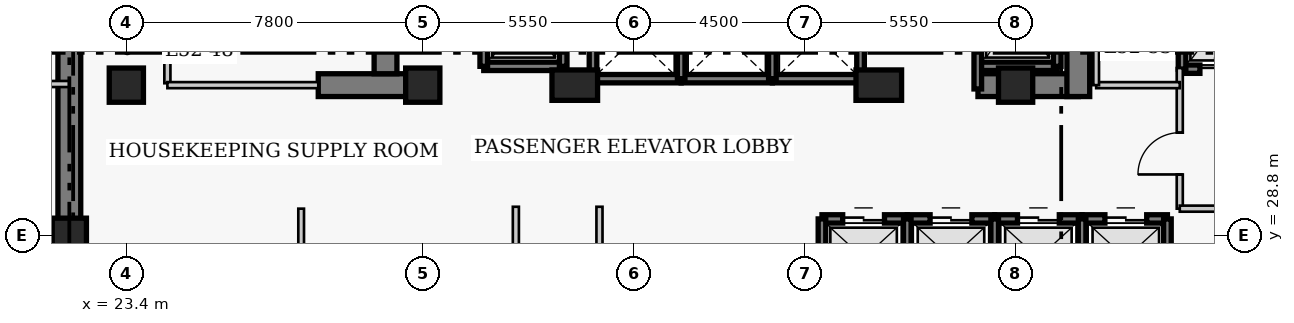
"""IFC4 building model, lengths in metres.
Left out: names, types, materials, properties, quantities, classifications, styles, units other than length and angle.
Written with IfcOpenShell. Run it as: python <this file> out.ifc"""

import sys

from ifc_helpers import new_model, si_unit, direction, frame, frame_2d, origin, origin_2d, place, context, subcontext, project, spatial, rectangle, extrude, element, fill, save


model = new_model("IFC4")
c1 = context("Model", 3, precision=1e-05, world=origin(), true_north=direction((0.0, 1.0)))
c2 = subcontext(c1, "Body", "Model", "MODEL_VIEW")
j1 = project(units=[si_unit("LENGTHUNIT", "METRE"), si_unit("PLANEANGLEUNIT", "RADIAN")], contexts=[c1])
p1 = place(None, origin())
s1 = spatial("IfcSite", under=j1, at=p1, CompositionType="ELEMENT")
p2 = place(p1, origin())
s2 = spatial("IfcBuilding", under=s1, at=p2, CompositionType="ELEMENT")
p3 = place(p2, frame((0.0, 0.0, 208.5)))
s3 = spatial("IfcBuildingStorey", under=s2, at=p3, CompositionType="ELEMENT", Elevation=208.5)
p4 = place(p3, frame((21.9, 27.05, 0.0), z_axis=(0.0, 0.0, 1.0), x_axis=(0.0, 1.0, 0.0)))
e1 = element("IfcWall", 1, at=p4, inside=s3, PredefinedType="SHEAR", context=c2, shape_type="SweptSolid", body=[
    extrude(rectangle(XDim=13.57, YDim=0.6, at=frame_2d((6.785, 0.0))), origin(), (0.0, 0.0, 1.0), 3.9),
])
p5 = place(p3, frame((28.45, 32.75, 0.0), z_axis=(0.0, 0.0, 1.0), x_axis=(1.0, 0.0, 0.0)))
e2 = element("IfcWall", 2, at=p5, inside=s3, PredefinedType="SHEAR", context=c2, shape_type="SweptSolid", body=[
    extrude(rectangle(XDim=2.4, YDim=0.6, at=frame_2d((1.2, 0.0))), origin(), (0.0, 0.0, 1.0), 3.9),
])
p6 = place(p3, frame((45.81, 32.75, 0.0), z_axis=(0.0, 0.0, 1.0), x_axis=(1.0, 0.0, 0.0)))
e3 = element("IfcWall", 3, at=p6, inside=s3, PredefinedType="SHEAR", context=c2, shape_type="SweptSolid", body=[
    extrude(rectangle(XDim=2.64, YDim=0.6, at=frame_2d((1.32, 0.0))), origin(), (0.0, 0.0, 1.0), 3.9),
])
p7 = place(p3, frame((30.22, 33.05, 0.0), z_axis=(0.0, 0.0, 1.0), x_axis=(0.0, 1.0, 0.0)))
e4 = element("IfcWall", 4, at=p7, inside=s3, PredefinedType="SHEAR", context=c2, shape_type="SweptSolid", body=[
    extrude(rectangle(XDim=7.27, YDim=0.6, at=frame_2d((3.635, 0.0))), origin(), (0.0, 0.0, 1.0), 3.9),
])
p8 = place(p3, frame((48.45, 32.45, 0.0), z_axis=(0.0, 0.0, 1.0), x_axis=(0.0, 1.0, 0.0)))
e5 = element("IfcWall", 5, at=p8, inside=s3, PredefinedType="SHEAR", context=c2, shape_type="SweptSolid", body=[
    extrude(rectangle(XDim=7.87, YDim=0.6, at=frame_2d((3.935, 0.0))), origin(), (0.0, 0.0, 1.0), 3.9),
])
p9 = place(p8, frame((5.75, 0.0, 0.0)))
e6 = element("IfcOpeningElement", 6, at=p9, cuts=e5, PredefinedType="OPENING", context=c2, shape_type="SweptSolid", body=[
    extrude(rectangle(XDim=1.1, YDim=2.15, at=frame_2d((0.55, 1.075))), frame((0.0, 0.31, 0.0), z_axis=(0.0, -1.0, 0.0), x_axis=(1.0, 0.0, 0.0)), (0.0, 0.0, 1.0), 0.62),
])
for number, where, z_axis, x_axis in (
    (7, (21.9, 28.8, 0.0), (0.0, 0.0, 1.0), (1.0, 0.0, 0.0)),
    (8, (23.4, 32.75, 0.0), (0.0, 0.0, 1.0), (1.0, 0.0, 0.0)),
    (9, (31.2, 32.75, 0.0), (0.0, 0.0, 1.0), (1.0, 0.0, 0.0)),
):
    element("IfcColumn", number, at=place(p3, frame(where, z_axis=z_axis, x_axis=x_axis)), inside=s3, PredefinedType="COLUMN", context=c2, shape_type="SweptSolid", body=[
        extrude(rectangle(XDim=0.9, YDim=0.9, at=origin_2d()), origin(), (0.0, 0.0, 1.0), 3.9),
    ])
for number, where, z_axis, x_axis in (
    (10, (35.2, 32.75, 0.0), (0.0, 0.0, 1.0), (1.0, 0.0, 0.0)),
    (11, (43.2, 32.75, 0.0), (0.0, 0.0, 1.0), (1.0, 0.0, 0.0)),
):
    element("IfcColumn", number, at=place(p3, frame(where, z_axis=z_axis, x_axis=x_axis)), inside=s3, PredefinedType="COLUMN", context=c2, shape_type="SweptSolid", body=[
        extrude(rectangle(XDim=1.2, YDim=0.8, at=origin_2d()), origin(), (0.0, 0.0, 1.0), 3.9),
    ])
p10 = place(p3, frame((46.8, 32.75, 0.0), z_axis=(0.0, 0.0, 1.0), x_axis=(1.0, 0.0, 0.0)))
e12 = element("IfcColumn", 12, at=p10, inside=s3, PredefinedType="COLUMN", context=c2, shape_type="SweptSolid", body=[
    extrude(rectangle(XDim=0.9, YDim=0.9, at=origin_2d()), origin(), (0.0, 0.0, 1.0), 3.9),
])
p11 = place(p3, frame((41.705, 29.23, 0.0), z_axis=(0.0, 0.0, 1.0), x_axis=(1.0, 0.0, 0.0)))
e13 = element("IfcWall", 13, at=p11, inside=s3, PredefinedType="SHEAR", context=c2, shape_type="SweptSolid", body=[
    extrude(rectangle(XDim=2.245, YDim=0.22, at=frame_2d((1.123, 0.0))), origin(), (0.0, 0.0, 1.0), 3.9),
])
p12 = place(p11, frame((0.545, 0.0, 0.0)))
e14 = element("IfcOpeningElement", 14, at=p12, cuts=e13, PredefinedType="OPENING", context=c2, shape_type="SweptSolid", body=[
    extrude(rectangle(XDim=1.1, YDim=2.15, at=frame_2d((0.55, 1.075))), frame((0.0, 0.12, 0.0), z_axis=(0.0, -1.0, 0.0), x_axis=(1.0, 0.0, 0.0)), (0.0, 0.0, 1.0), 0.24),
])
p13 = place(p3, frame((41.705, 27.17, 0.0), z_axis=(0.0, 0.0, 1.0), x_axis=(0.0, 1.0, 0.0)))
e15 = element("IfcWall", 15, at=p13, inside=s3, PredefinedType="SHEAR", context=c2, shape_type="SweptSolid", body=[
    extrude(rectangle(XDim=2.06, YDim=0.2, at=frame_2d((1.03, 0.0))), origin(), (0.0, 0.0, 1.0), 3.9),
])
p14 = place(p3, frame((43.95, 29.23, 0.0), z_axis=(0.0, 0.0, 1.0), x_axis=(1.0, 0.0, 0.0)))
e16 = element("IfcWall", 16, at=p14, inside=s3, PredefinedType="SHEAR", context=c2, shape_type="SweptSolid", body=[
    extrude(rectangle(XDim=2.3, YDim=0.22, at=frame_2d((1.15, 0.0))), origin(), (0.0, 0.0, 1.0), 3.9),
])
p15 = place(p14, frame((0.6, 0.0, 0.0)))
e17 = element("IfcOpeningElement", 17, at=p15, cuts=e16, PredefinedType="OPENING", context=c2, shape_type="SweptSolid", body=[
    extrude(rectangle(XDim=1.1, YDim=2.15, at=frame_2d((0.55, 1.075))), frame((0.0, 0.12, 0.0), z_axis=(0.0, -1.0, 0.0), x_axis=(1.0, 0.0, 0.0)), (0.0, 0.0, 1.0), 0.24),
])
p16 = place(p3, frame((43.95, 27.17, 0.0), z_axis=(0.0, 0.0, 1.0), x_axis=(0.0, 1.0, 0.0)))
e18 = element("IfcWall", 18, at=p16, inside=s3, PredefinedType="SHEAR", context=c2, shape_type="SweptSolid", body=[
    extrude(rectangle(XDim=2.06, YDim=0.2, at=frame_2d((1.03, 0.0))), origin(), (0.0, 0.0, 1.0), 3.9),
])
p17 = place(p3, frame((46.25, 29.23, 0.0), z_axis=(0.0, 0.0, 1.0), x_axis=(1.0, 0.0, 0.0)))
e19 = element("IfcWall", 19, at=p17, inside=s3, PredefinedType="SHEAR", context=c2, shape_type="SweptSolid", body=[
    extrude(rectangle(XDim=2.3, YDim=0.22, at=frame_2d((1.15, 0.0))), origin(), (0.0, 0.0, 1.0), 3.9),
])
p18 = place(p17, frame((0.6, 0.0, 0.0)))
e20 = element("IfcOpeningElement", 20, at=p18, cuts=e19, PredefinedType="OPENING", context=c2, shape_type="SweptSolid", body=[
    extrude(rectangle(XDim=1.1, YDim=2.15, at=frame_2d((0.55, 1.075))), frame((0.0, 0.12, 0.0), z_axis=(0.0, -1.0, 0.0), x_axis=(1.0, 0.0, 0.0)), (0.0, 0.0, 1.0), 0.24),
])
p19 = place(p3, frame((46.25, 27.17, 0.0), z_axis=(0.0, 0.0, 1.0), x_axis=(0.0, 1.0, 0.0)))
e21 = element("IfcWall", 21, at=p19, inside=s3, PredefinedType="SHEAR", context=c2, shape_type="SweptSolid", body=[
    extrude(rectangle(XDim=2.06, YDim=0.2, at=frame_2d((1.03, 0.0))), origin(), (0.0, 0.0, 1.0), 3.9),
])
p20 = place(p3, frame((48.55, 29.23, 0.0), z_axis=(0.0, 0.0, 1.0), x_axis=(1.0, 0.0, 0.0)))
e22 = element("IfcWall", 22, at=p20, inside=s3, PredefinedType="SHEAR", context=c2, shape_type="SweptSolid", body=[
    extrude(rectangle(XDim=2.245, YDim=0.22, at=frame_2d((1.123, 0.0))), origin(), (0.0, 0.0, 1.0), 3.9),
])
p21 = place(p20, frame((0.6, 0.0, 0.0)))
e23 = element("IfcOpeningElement", 23, at=p21, cuts=e22, PredefinedType="OPENING", context=c2, shape_type="SweptSolid", body=[
    extrude(rectangle(XDim=1.1, YDim=2.15, at=frame_2d((0.55, 1.075))), frame((0.0, 0.12, 0.0), z_axis=(0.0, -1.0, 0.0), x_axis=(1.0, 0.0, 0.0)), (0.0, 0.0, 1.0), 0.24),
])
for number, where, z_axis, x_axis in (
    (24, (48.55, 27.17, 0.0), (0.0, 0.0, 1.0), (0.0, 1.0, 0.0)),
    (25, (50.795, 27.17, 0.0), (0.0, 0.0, 1.0), (0.0, 1.0, 0.0)),
):
    element("IfcWall", number, at=place(p3, frame(where, z_axis=z_axis, x_axis=x_axis)), inside=s3, PredefinedType="SHEAR", context=c2, shape_type="SweptSolid", body=[
        extrude(rectangle(XDim=2.06, YDim=0.2, at=frame_2d((1.03, 0.0))), origin(), (0.0, 0.0, 1.0), 3.9),
    ])
p22 = place(p3, frame((35.68, 32.92, 0.0), z_axis=(0.0, 0.0, 1.0), x_axis=(1.0, 0.0, 0.0)))
e26 = element("IfcWall", 26, at=p22, inside=s3, PredefinedType="SHEAR", context=c2, shape_type="SweptSolid", body=[
    extrude(rectangle(XDim=2.32, YDim=0.22, at=frame_2d((1.16, 0.0))), origin(), (0.0, 0.0, 1.0), 3.9),
])
p23 = place(p3, frame((35.68, 32.92, 0.0), z_axis=(0.0, 0.0, 1.0), x_axis=(0.0, 1.0, 0.0)))
e27 = element("IfcWall", 27, at=p23, inside=s3, PredefinedType="SHEAR", context=c2, shape_type="SweptSolid", body=[
    extrude(rectangle(XDim=2.16, YDim=0.2, at=frame_2d((1.08, 0.0))), origin(), (0.0, 0.0, 1.0), 3.9),
])
p24 = place(p3, frame((38.0, 32.92, 0.0), z_axis=(0.0, 0.0, 1.0), x_axis=(1.0, 0.0, 0.0)))
e28 = element("IfcWall", 28, at=p24, inside=s3, PredefinedType="SHEAR", context=c2, shape_type="SweptSolid", body=[
    extrude(rectangle(XDim=2.4, YDim=0.22, at=frame_2d((1.2, 0.0))), origin(), (0.0, 0.0, 1.0), 3.9),
])
p25 = place(p3, frame((38.0, 32.92, 0.0), z_axis=(0.0, 0.0, 1.0), x_axis=(0.0, 1.0, 0.0)))
e29 = element("IfcWall", 29, at=p25, inside=s3, PredefinedType="SHEAR", context=c2, shape_type="SweptSolid", body=[
    extrude(rectangle(XDim=2.16, YDim=0.2, at=frame_2d((1.08, 0.0))), origin(), (0.0, 0.0, 1.0), 3.9),
])
p26 = place(p3, frame((40.4, 32.92, 0.0), z_axis=(0.0, 0.0, 1.0), x_axis=(1.0, 0.0, 0.0)))
e30 = element("IfcWall", 30, at=p26, inside=s3, PredefinedType="SHEAR", context=c2, shape_type="SweptSolid", body=[
    extrude(rectangle(XDim=2.32, YDim=0.22, at=frame_2d((1.16, 0.0))), origin(), (0.0, 0.0, 1.0), 3.9),
])
for number, where, z_axis, x_axis in (
    (31, (40.4, 32.92, 0.0), (0.0, 0.0, 1.0), (0.0, 1.0, 0.0)),
    (32, (42.72, 32.92, 0.0), (0.0, 0.0, 1.0), (0.0, 1.0, 0.0)),
):
    element("IfcWall", number, at=place(p3, frame(where, z_axis=z_axis, x_axis=x_axis)), inside=s3, PredefinedType="SHEAR", context=c2, shape_type="SweptSolid", body=[
        extrude(rectangle(XDim=2.16, YDim=0.2, at=frame_2d((1.08, 0.0))), origin(), (0.0, 0.0, 1.0), 3.9),
    ])
p27 = place(p3, frame((51.18, 33.17, 0.0), z_axis=(0.0, 0.0, 1.0), x_axis=(1.0, 0.0, 0.0)))
e33 = element("IfcWall", 33, at=p27, inside=s3, PredefinedType="SHEAR", context=c2, shape_type="SweptSolid", body=[
    extrude(rectangle(XDim=2.42, YDim=0.22, at=frame_2d((1.21, 0.0))), origin(), (0.0, 0.0, 1.0), 3.9),
])
p28 = place(p27, frame((0.47, 0.0, 0.0)))
e34 = element("IfcOpeningElement", 34, at=p28, cuts=e33, PredefinedType="OPENING", context=c2, shape_type="SweptSolid", body=[
    extrude(rectangle(XDim=1.3, YDim=2.15, at=frame_2d((0.65, 1.075))), frame((0.0, 0.12, 0.0), z_axis=(0.0, -1.0, 0.0), x_axis=(1.0, 0.0, 0.0)), (0.0, 0.0, 1.0), 0.24),
])
p29 = place(p3, frame((51.18, 33.17, 0.0), z_axis=(0.0, 0.0, 1.0), x_axis=(0.0, 1.0, 0.0)))
e35 = element("IfcWall", 35, at=p29, inside=s3, PredefinedType="SHEAR", context=c2, shape_type="SweptSolid", body=[
    extrude(rectangle(XDim=2.86, YDim=0.2, at=frame_2d((1.43, 0.0))), origin(), (0.0, 0.0, 1.0), 3.9),
])
p30 = place(p3, frame((32.805, 33.245, 0.0), z_axis=(0.0, 0.0, 1.0), x_axis=(1.0, 0.0, 0.0)))
e36 = element("IfcWall", 36, at=p30, inside=s3, PredefinedType="SHEAR", context=c2, shape_type="SweptSolid", body=[
    extrude(rectangle(XDim=2.09, YDim=0.22, at=frame_2d((1.045, 0.0))), origin(), (0.0, 0.0, 1.0), 3.9),
])
for number, where, z_axis, x_axis in (
    (37, (32.805, 33.245, 0.0), (0.0, 0.0, 1.0), (0.0, 1.0, 0.0)),
    (38, (34.895, 33.245, 0.0), (0.0, 0.0, 1.0), (0.0, 1.0, 0.0)),
):
    element("IfcWall", number, at=place(p3, frame(where, z_axis=z_axis, x_axis=x_axis)), inside=s3, PredefinedType="SHEAR", context=c2, shape_type="SweptSolid", body=[
        extrude(rectangle(XDim=2.91, YDim=0.2, at=frame_2d((1.455, 0.0))), origin(), (0.0, 0.0, 1.0), 3.9),
    ])
p31 = place(p3, frame((45.805, 33.245, 0.0), z_axis=(0.0, 0.0, 1.0), x_axis=(1.0, 0.0, 0.0)))
e39 = element("IfcWall", 39, at=p31, inside=s3, PredefinedType="SHEAR", context=c2, shape_type="SweptSolid", body=[
    extrude(rectangle(XDim=2.09, YDim=0.22, at=frame_2d((1.045, 0.0))), origin(), (0.0, 0.0, 1.0), 3.9),
])
p32 = place(p3, frame((45.805, 32.65, 0.0), z_axis=(0.0, 0.0, 1.0), x_axis=(0.0, 1.0, 0.0)))
e40 = element("IfcWall", 40, at=p32, inside=s3, PredefinedType="SHEAR", context=c2, shape_type="SweptSolid", body=[
    extrude(rectangle(XDim=3.505, YDim=0.2, at=frame_2d((1.752, 0.0))), origin(), (0.0, 0.0, 1.0), 3.9),
])
p33 = place(p3, frame((47.895, 33.245, 0.0), z_axis=(0.0, 0.0, 1.0), x_axis=(0.0, 1.0, 0.0)))
e41 = element("IfcWall", 41, at=p33, inside=s3, PredefinedType="SHEAR", context=c2, shape_type="SweptSolid", body=[
    extrude(rectangle(XDim=2.91, YDim=0.2, at=frame_2d((1.455, 0.0))), origin(), (0.0, 0.0, 1.0), 3.9),
])
p34 = place(p3, frame((24.48, 32.8, 0.0), z_axis=(0.0, 0.0, 1.0), x_axis=(0.0, 1.0, 0.0)))
e42 = element("IfcWall", 42, at=p34, inside=s3, PredefinedType="PARTITIONING", context=c2, shape_type="SweptSolid", body=[
    extrude(rectangle(XDim=3.57, YDim=0.16, at=frame_2d((1.785, 0.0))), origin(), (0.0, 0.0, 1.0), 3.65),
])
p35 = place(p34, frame((1.604, 0.0, 0.0)))
e43 = element("IfcOpeningElement", 43, at=p35, cuts=e42, PredefinedType="OPENING", context=c2, shape_type="SweptSolid", body=[
    extrude(rectangle(XDim=0.9, YDim=2.1, at=frame_2d((0.45, 1.05))), frame((0.0, 0.09, 0.0), z_axis=(0.0, -1.0, 0.0), x_axis=(1.0, 0.0, 0.0)), (0.0, 0.0, 1.0), 0.18),
])
p36 = place(p3, frame((51.12, 29.5, 0.0), z_axis=(0.0, 0.0, 1.0), x_axis=(0.0, 1.0, 0.0)))
e44 = element("IfcWall", 44, at=p36, inside=s3, PredefinedType="PARTITIONING", context=c2, shape_type="SweptSolid", body=[
    extrude(rectangle(XDim=3.7, YDim=0.16, at=frame_2d((1.85, 0.0))), origin(), (0.0, 0.0, 1.0), 3.65),
])
p37 = place(p36, frame((0.9, 0.0, 0.0)))
e45 = element("IfcOpeningElement", 45, at=p37, cuts=e44, PredefinedType="OPENING", context=c2, shape_type="SweptSolid", body=[
    extrude(rectangle(XDim=1.1, YDim=2.15, at=frame_2d((0.55, 1.075))), frame((0.0, 0.09, 0.0), z_axis=(0.0, -1.0, 0.0), x_axis=(1.0, 0.0, 0.0)), (0.0, 0.0, 1.0), 0.18),
])
p38 = place(p3, frame((51.12, 29.5, 0.0), z_axis=(0.0, 0.0, 1.0), x_axis=(1.0, 0.0, 0.0)))
e46 = element("IfcWall", 46, at=p38, inside=s3, PredefinedType="PARTITIONING", context=c2, shape_type="SweptSolid", body=[
    extrude(rectangle(XDim=5.63, YDim=0.16, at=frame_2d((2.815, 0.0))), origin(), (0.0, 0.0, 1.0), 3.65),
])
p39 = place(p3, frame((24.48, 32.75, 0.0), z_axis=(0.0, 0.0, 1.0), x_axis=(1.0, 0.0, 0.0)))
e47 = element("IfcWall", 47, at=p39, inside=s3, PredefinedType="PARTITIONING", context=c2, shape_type="SweptSolid", body=[
    extrude(rectangle(XDim=3.97, YDim=0.16, at=frame_2d((1.985, 0.0))), origin(), (0.0, 0.0, 1.0), 3.65),
])
p40 = place(p3, frame((48.92, 32.75, 0.0), z_axis=(0.0, 0.0, 1.0), x_axis=(1.0, 0.0, 0.0)))
e48 = element("IfcWall", 48, at=p40, inside=s3, PredefinedType="PARTITIONING", context=c2, shape_type="SweptSolid", body=[
    extrude(rectangle(XDim=2.2, YDim=0.16, at=frame_2d((1.1, 0.0))), origin(), (0.0, 0.0, 1.0), 3.65),
])
p41 = place(p3, frame((48.92, 32.75, 0.0), z_axis=(0.0, 0.0, 1.0), x_axis=(0.0, 1.0, 0.0)))
e49 = element("IfcWall", 49, at=p41, inside=s3, PredefinedType="PARTITIONING", context=c2, shape_type="SweptSolid", body=[
    extrude(rectangle(XDim=3.62, YDim=0.15, at=frame_2d((1.81, 0.0))), origin(), (0.0, 0.0, 1.0), 3.65),
])
for number, where, z_axis, x_axis in (
    (50, (33.65, 18.51, 0.0), (0.0, 0.0, 1.0), (0.0, 1.0, 0.0)),
    (51, (35.85, 18.51, 0.0), (0.0, 0.0, 1.0), (0.0, 1.0, 0.0)),
):
    element("IfcWall", number, at=place(p3, frame(where, z_axis=z_axis, x_axis=x_axis)), inside=s3, PredefinedType="PARTITIONING", context=c2, shape_type="SweptSolid", body=[
        extrude(rectangle(XDim=11.04, YDim=0.16, at=frame_2d((5.52, 0.0))), origin(), (0.0, 0.0, 1.0), 3.65),
    ])
p42 = place(p3, frame((19.16, 32.78, 0.0), z_axis=(0.0, 0.0, 1.0), x_axis=(1.0, 0.0, 0.0)))
e52 = element("IfcWall", 52, at=p42, inside=s3, PredefinedType="PARTITIONING", context=c2, shape_type="SweptSolid", body=[
    extrude(rectangle(XDim=2.74, YDim=0.16, at=frame_2d((1.37, 0.0))), origin(), (0.0, 0.0, 1.0), 3.65),
])
p43 = place(p3, frame((28.0, 18.51, 0.0), z_axis=(0.0, 0.0, 1.0), x_axis=(0.0, 1.0, 0.0)))
e53 = element("IfcWall", 53, at=p43, inside=s3, PredefinedType="PARTITIONING", context=c2, shape_type="SweptSolid", body=[
    extrude(rectangle(XDim=10.99, YDim=0.15, at=frame_2d((5.495, 0.0))), origin(), (0.0, 0.0, 1.0), 3.65),
])
p44 = place(p12, origin())
e54 = element("IfcDoor", 54, at=p44, inside=s3, OperationType="DOUBLE_DOOR_SLIDING", PredefinedType="DOOR", context=c2, shape_type="SweptSolid", body=[
    extrude(rectangle(XDim=1.1, YDim=2.15, at=frame_2d((0.55, 1.075))), frame((0.0, 0.025, 0.0), z_axis=(0.0, -1.0, 0.0), x_axis=(1.0, 0.0, 0.0)), (0.0, 0.0, 1.0), 0.05),
])
fill(e14, e54)
p45 = place(p15, origin())
e55 = element("IfcDoor", 55, at=p45, inside=s3, OperationType="DOUBLE_DOOR_SLIDING", PredefinedType="DOOR", context=c2, shape_type="SweptSolid", body=[
    extrude(rectangle(XDim=1.1, YDim=2.15, at=frame_2d((0.55, 1.075))), frame((0.0, 0.025, 0.0), z_axis=(0.0, -1.0, 0.0), x_axis=(1.0, 0.0, 0.0)), (0.0, 0.0, 1.0), 0.05),
])
fill(e17, e55)
p46 = place(p18, origin())
e56 = element("IfcDoor", 56, at=p46, inside=s3, OperationType="DOUBLE_DOOR_SLIDING", PredefinedType="DOOR", context=c2, shape_type="SweptSolid", body=[
    extrude(rectangle(XDim=1.1, YDim=2.15, at=frame_2d((0.55, 1.075))), frame((0.0, 0.025, 0.0), z_axis=(0.0, -1.0, 0.0), x_axis=(1.0, 0.0, 0.0)), (0.0, 0.0, 1.0), 0.05),
])
fill(e20, e56)
p47 = place(p21, origin())
e57 = element("IfcDoor", 57, at=p47, inside=s3, OperationType="DOUBLE_DOOR_SLIDING", PredefinedType="DOOR", context=c2, shape_type="SweptSolid", body=[
    extrude(rectangle(XDim=1.1, YDim=2.15, at=frame_2d((0.55, 1.075))), frame((0.0, 0.025, 0.0), z_axis=(0.0, -1.0, 0.0), x_axis=(1.0, 0.0, 0.0)), (0.0, 0.0, 1.0), 0.05),
])
fill(e23, e57)
p48 = place(p28, origin())
e58 = element("IfcDoor", 58, at=p48, inside=s3, OperationType="DOUBLE_DOOR_SLIDING", PredefinedType="DOOR", context=c2, shape_type="SweptSolid", body=[
    extrude(rectangle(XDim=1.3, YDim=2.15, at=frame_2d((0.65, 1.075))), frame((0.0, 0.025, 0.0), z_axis=(0.0, -1.0, 0.0), x_axis=(1.0, 0.0, 0.0)), (0.0, 0.0, 1.0), 0.05),
])
fill(e34, e58)
p49 = place(p37, origin())
e59 = element("IfcDoor", 59, at=p49, inside=s3, OperationType="SINGLE_SWING_LEFT", PredefinedType="DOOR", context=c2, shape_type="SweptSolid", body=[
    extrude(rectangle(XDim=1.1, YDim=2.15, at=frame_2d((0.55, 1.075))), frame((0.0, 0.025, 0.0), z_axis=(0.0, -1.0, 0.0), x_axis=(1.0, 0.0, 0.0)), (0.0, 0.0, 1.0), 0.05),
])
fill(e45, e59)
save(model, sys.argv[1])
